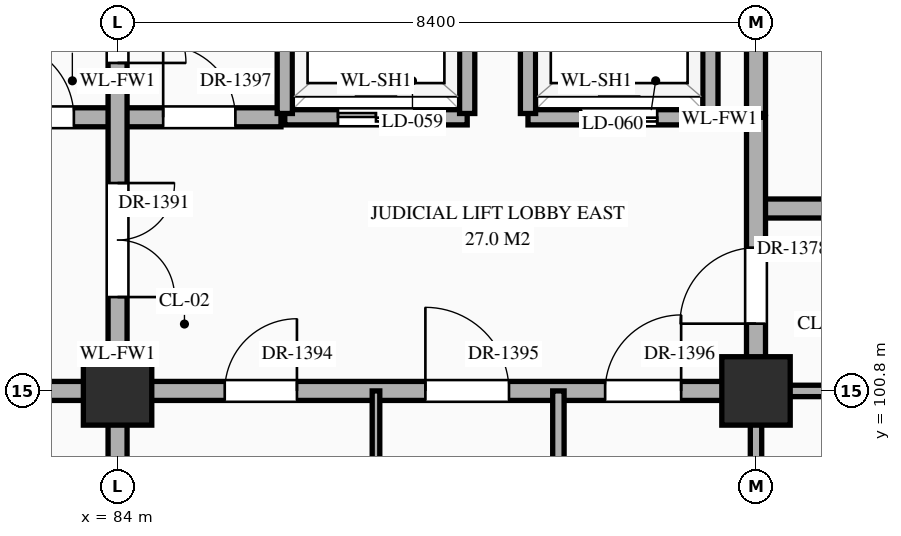
"""IFC4 building model, lengths in metres.
Left out: names, types, materials, properties, quantities, classifications, styles, units other than length and angle.
Written with IfcOpenShell. Run it as: python <this file> out.ifc"""

import sys

from ifc_helpers import new_model, si_unit, direction, frame, frame_2d, origin, origin_2d, place, context, subcontext, project, spatial, rectangle, extrude, element, fill, save


model = new_model("IFC4")
c1 = context("Model", 3, precision=1e-05, world=origin(), true_north=direction((0.0, 1.0)))
c2 = subcontext(c1, "Body", "Model", "MODEL_VIEW")
j1 = project(units=[si_unit("LENGTHUNIT", "METRE"), si_unit("PLANEANGLEUNIT", "RADIAN")], contexts=[c1])
p1 = place(None, origin())
s1 = spatial("IfcSite", under=j1, at=p1, CompositionType="ELEMENT")
p2 = place(p1, origin())
s2 = spatial("IfcBuilding", under=s1, at=p2, CompositionType="ELEMENT")
p3 = place(p2, frame((0.0, 0.0, 10.8)))
s3 = spatial("IfcBuildingStorey", under=s2, at=p3, CompositionType="ELEMENT", Elevation=10.8)
for number, where, z_axis, x_axis in (
    (1, (84.0, 100.8, 0.0), (0.0, 0.0, 1.0), (1.0, 0.0, 0.0)),
    (2, (92.4, 100.8, 0.0), (0.0, 0.0, 1.0), (1.0, 0.0, 0.0)),
):
    element("IfcColumn", number, at=place(p3, frame(where, z_axis=z_axis, x_axis=x_axis)), inside=s3, PredefinedType="COLUMN", context=c2, shape_type="SweptSolid", body=[
        extrude(rectangle(XDim=0.9, YDim=0.9, at=origin_2d()), origin(), (0.0, 0.0, 1.0), 5.4),
    ])
p4 = place(p3, frame((75.6, 100.8, 0.0), z_axis=(0.0, 0.0, 1.0), x_axis=(1.0, 0.0, 0.0)))
e3 = element("IfcWall", 3, at=p4, inside=s3, PredefinedType="STANDARD", context=c2, shape_type="SweptSolid", body=[
    extrude(rectangle(XDim=16.8, YDim=0.25, at=frame_2d((8.4, 0.0))), origin(), (0.0, 0.0, 1.0), 4.27),
])
p5 = place(p4, frame((3.65, 0.0, 0.0)))
e4 = element("IfcOpeningElement", 4, at=p5, cuts=e3, PredefinedType="OPENING", context=c2, shape_type="SweptSolid", body=[
    extrude(rectangle(XDim=1.1, YDim=2.2, at=frame_2d((0.55, 1.1))), frame((0.0, 0.137, 0.0), z_axis=(0.0, -1.0, 0.0), x_axis=(1.0, 0.0, 0.0)), (0.0, 0.0, 1.0), 0.274),
])
p6 = place(p4, frame((9.81, 0.0, 0.0)))
e5 = element("IfcOpeningElement", 5, at=p6, cuts=e3, PredefinedType="OPENING", context=c2, shape_type="SweptSolid", body=[
    extrude(rectangle(XDim=0.95, YDim=2.15, at=frame_2d((0.475, 1.075))), frame((0.0, 0.137, 0.0), z_axis=(0.0, -1.0, 0.0), x_axis=(1.0, 0.0, 0.0)), (0.0, 0.0, 1.0), 0.274),
])
p7 = place(p4, frame((12.45, 0.0, 0.0)))
e6 = element("IfcOpeningElement", 6, at=p7, cuts=e3, PredefinedType="OPENING", context=c2, shape_type="SweptSolid", body=[
    extrude(rectangle(XDim=1.1, YDim=2.2, at=frame_2d((0.55, 1.1))), frame((0.0, 0.137, 0.0), z_axis=(0.0, -1.0, 0.0), x_axis=(1.0, 0.0, 0.0)), (0.0, 0.0, 1.0), 0.274),
])
p8 = place(p4, frame((14.815, 0.0, 0.0)))
e7 = element("IfcOpeningElement", 7, at=p8, cuts=e3, PredefinedType="OPENING", context=c2, shape_type="SweptSolid", body=[
    extrude(rectangle(XDim=1.0, YDim=2.2, at=frame_2d((0.5, 1.1))), frame((0.0, 0.137, 0.0), z_axis=(0.0, -1.0, 0.0), x_axis=(1.0, 0.0, 0.0)), (0.0, 0.0, 1.0), 0.274),
])
p9 = place(p3, frame((92.4, 100.8, 0.0), z_axis=(0.0, 0.0, 1.0), x_axis=(1.0, 0.0, 0.0)))
e8 = element("IfcWall", 8, at=p9, inside=s3, PredefinedType="STANDARD", context=c2, shape_type="SweptSolid", body=[
    extrude(rectangle(XDim=4.2, YDim=0.15, at=frame_2d((2.1, 0.0))), origin(), (0.0, 0.0, 1.0), 4.27),
])
p10 = place(p9, frame((1.765, 0.0, 0.0)))
e9 = element("IfcOpeningElement", 9, at=p10, cuts=e8, PredefinedType="OPENING", context=c2, shape_type="SweptSolid", body=[
    extrude(rectangle(XDim=1.04, YDim=2.2, at=frame_2d((0.52, 1.1))), frame((0.0, 0.087, 0.0), z_axis=(0.0, -1.0, 0.0), x_axis=(1.0, 0.0, 0.0)), (0.0, 0.0, 1.0), 0.174),
])
p11 = place(p3, frame((92.4, 103.2, 0.0), z_axis=(0.0, 0.0, 1.0), x_axis=(1.0, 0.0, 0.0)))
e10 = element("IfcWall", 10, at=p11, inside=s3, PredefinedType="STANDARD", context=c2, shape_type="SweptSolid", body=[
    extrude(rectangle(XDim=4.2, YDim=0.25, at=frame_2d((2.1, 0.0))), origin(), (0.0, 0.0, 1.0), 5.12),
])
p12 = place(p11, frame((1.625, 0.0, 0.0)))
e11 = element("IfcOpeningElement", 11, at=p12, cuts=e10, PredefinedType="OPENING", context=c2, shape_type="SweptSolid", body=[
    extrude(rectangle(XDim=0.95, YDim=2.15, at=frame_2d((0.475, 1.075))), frame((0.0, 0.137, 0.0), z_axis=(0.0, -1.0, 0.0), x_axis=(1.0, 0.0, 0.0)), (0.0, 0.0, 1.0), 0.274),
])
p13 = place(p3, frame((81.85, 104.4, 0.0), z_axis=(0.0, 0.0, 1.0), x_axis=(1.0, 0.0, 0.0)))
e12 = element("IfcWall", 12, at=p13, inside=s3, PredefinedType="STANDARD", context=c2, shape_type="SweptSolid", body=[
    extrude(rectangle(XDim=4.3, YDim=0.25, at=frame_2d((2.15, 0.0))), origin(), (0.0, 0.0, 1.0), 5.12),
])
p14 = place(p13, frame((0.575, 0.0, 0.0)))
e13 = element("IfcOpeningElement", 13, at=p14, cuts=e12, PredefinedType="OPENING", context=c2, shape_type="SweptSolid", body=[
    extrude(rectangle(XDim=1.0, YDim=2.2, at=frame_2d((0.5, 1.1))), frame((0.0, 0.137, 0.0), z_axis=(0.0, -1.0, 0.0), x_axis=(1.0, 0.0, 0.0)), (0.0, 0.0, 1.0), 0.274),
])
p15 = place(p13, frame((2.75, 0.0, 0.0)))
e14 = element("IfcOpeningElement", 14, at=p15, cuts=e12, PredefinedType="OPENING", context=c2, shape_type="SweptSolid", body=[
    extrude(rectangle(XDim=0.95, YDim=2.15, at=frame_2d((0.475, 1.075))), frame((0.0, 0.137, 0.0), z_axis=(0.0, -1.0, 0.0), x_axis=(1.0, 0.0, 0.0)), (0.0, 0.0, 1.0), 0.274),
])
p16 = place(p3, frame((86.2, 104.4, 0.0), z_axis=(0.0, 0.0, 1.0), x_axis=(1.0, 0.0, 0.0)))
e15 = element("IfcWall", 15, at=p16, inside=s3, PredefinedType="STANDARD", context=c2, shape_type="SweptSolid", body=[
    extrude(rectangle(XDim=2.4, YDim=0.2, at=frame_2d((1.2, 0.0))), origin(), (0.0, 0.0, 1.0), 5.12),
])
p17 = place(p16, frame((0.7, 0.0, 0.0)))
e16 = element("IfcOpeningElement", 16, at=p17, cuts=e15, PredefinedType="OPENING", context=c2, shape_type="SweptSolid", body=[
    extrude(rectangle(XDim=1.0, YDim=2.15, at=frame_2d((0.5, 1.075))), frame((0.0, 0.112, 0.0), z_axis=(0.0, -1.0, 0.0), x_axis=(1.0, 0.0, 0.0)), (0.0, 0.0, 1.0), 0.224),
])
p18 = place(p3, frame((89.4, 104.4, 0.0), z_axis=(0.0, 0.0, 1.0), x_axis=(1.0, 0.0, 0.0)))
e17 = element("IfcWall", 17, at=p18, inside=s3, PredefinedType="STANDARD", context=c2, shape_type="SweptSolid", body=[
    extrude(rectangle(XDim=2.4, YDim=0.2, at=frame_2d((1.2, 0.0))), origin(), (0.0, 0.0, 1.0), 5.12),
])
p19 = place(p18, frame((0.7, 0.0, 0.0)))
e18 = element("IfcOpeningElement", 18, at=p19, cuts=e17, PredefinedType="OPENING", context=c2, shape_type="SweptSolid", body=[
    extrude(rectangle(XDim=1.0, YDim=2.15, at=frame_2d((0.5, 1.075))), frame((0.0, 0.112, 0.0), z_axis=(0.0, -1.0, 0.0), x_axis=(1.0, 0.0, 0.0)), (0.0, 0.0, 1.0), 0.224),
])
p20 = place(p3, frame((84.0, 79.2, 0.0), z_axis=(0.0, 0.0, 1.0), x_axis=(0.0, 1.0, 0.0)))
e19 = element("IfcWall", 19, at=p20, inside=s3, PredefinedType="STANDARD", context=c2, shape_type="SweptSolid", body=[
    extrude(rectangle(XDim=35.96, YDim=0.25, at=frame_2d((17.98, 0.0))), origin(), (0.0, 0.0, 1.0), 4.37),
])
p21 = place(p20, frame((22.835, 0.0, 0.0)))
e20 = element("IfcOpeningElement", 20, at=p21, cuts=e19, PredefinedType="OPENING", context=c2, shape_type="SweptSolid", body=[
    extrude(rectangle(XDim=1.5, YDim=2.25, at=frame_2d((0.75, 1.125))), frame((0.0, 0.137, 0.0), z_axis=(0.0, -1.0, 0.0), x_axis=(1.0, 0.0, 0.0)), (0.0, 0.0, 1.0), 0.274),
])
p22 = place(p20, frame((12.465, 0.0, 0.0)))
e21 = element("IfcOpeningElement", 21, at=p22, cuts=e19, PredefinedType="OPENING", context=c2, shape_type="SweptSolid", body=[
    extrude(rectangle(XDim=1.1, YDim=2.2, at=frame_2d((0.55, 1.1))), frame((0.0, 0.137, 0.0), z_axis=(0.0, -1.0, 0.0), x_axis=(1.0, 0.0, 0.0)), (0.0, 0.0, 1.0), 0.274),
])
p23 = place(p20, frame((15.31, 0.0, 0.0)))
e22 = element("IfcOpeningElement", 22, at=p23, cuts=e19, PredefinedType="OPENING", context=c2, shape_type="SweptSolid", body=[
    extrude(rectangle(XDim=0.95, YDim=2.15, at=frame_2d((0.475, 1.075))), frame((0.0, 0.137, 0.0), z_axis=(0.0, -1.0, 0.0), x_axis=(1.0, 0.0, 0.0)), (0.0, 0.0, 1.0), 0.274),
])
p24 = place(p20, frame((25.915, 0.0, 0.0)))
e23 = element("IfcOpeningElement", 23, at=p24, cuts=e19, PredefinedType="OPENING", context=c2, shape_type="SweptSolid", body=[
    extrude(rectangle(XDim=1.8, YDim=2.35, at=frame_2d((0.9, 1.175))), frame((0.0, 0.137, 0.0), z_axis=(0.0, -1.0, 0.0), x_axis=(1.0, 0.0, 0.0)), (0.0, 0.0, 1.0), 0.274),
])
p25 = place(p20, frame((29.71, 0.0, 0.0)))
e24 = element("IfcOpeningElement", 24, at=p25, cuts=e19, PredefinedType="OPENING", context=c2, shape_type="SweptSolid", body=[
    extrude(rectangle(XDim=0.95, YDim=2.15, at=frame_2d((0.475, 1.075))), frame((0.0, 0.137, 0.0), z_axis=(0.0, -1.0, 0.0), x_axis=(1.0, 0.0, 0.0)), (0.0, 0.0, 1.0), 0.274),
])
p26 = place(p20, frame((5.265, 0.0, 0.0)))
e25 = element("IfcOpeningElement", 25, at=p26, cuts=e19, PredefinedType="OPENING", context=c2, shape_type="SweptSolid", body=[
    extrude(rectangle(XDim=1.1, YDim=2.2, at=frame_2d((0.55, 1.1))), frame((0.0, 0.137, 0.0), z_axis=(0.0, -1.0, 0.0), x_axis=(1.0, 0.0, 0.0)), (0.0, 0.0, 1.0), 0.274),
])
p27 = place(p3, frame((86.2, 104.45, 0.0), z_axis=(0.0, 0.0, 1.0), x_axis=(0.0, 1.0, 0.0)))
e26 = element("IfcWall", 26, at=p27, inside=s3, PredefinedType="STANDARD", context=c2, shape_type="SweptSolid", body=[
    extrude(rectangle(XDim=2.3, YDim=0.2, at=frame_2d((1.15, 0.0))), origin(), (0.0, 0.0, 1.0), 5.12),
])
p28 = place(p3, frame((87.4, 96.0, 0.0), z_axis=(0.0, 0.0, 1.0), x_axis=(0.0, 1.0, 0.0)))
e27 = element("IfcWall", 27, at=p28, inside=s3, PredefinedType="STANDARD", context=c2, shape_type="SweptSolid", body=[
    extrude(rectangle(XDim=4.8, YDim=0.1, at=frame_2d((2.4, 0.0))), origin(), (0.0, 0.0, 1.0), 5.12),
])
p29 = place(p28, frame((1.88, 0.0, 0.0)))
e28 = element("IfcOpeningElement", 28, at=p29, cuts=e27, PredefinedType="OPENING", context=c2, shape_type="SweptSolid", body=[
    extrude(rectangle(XDim=1.04, YDim=2.2, at=frame_2d((0.52, 1.1))), frame((0.0, 0.062, 0.0), z_axis=(0.0, -1.0, 0.0), x_axis=(1.0, 0.0, 0.0)), (0.0, 0.0, 1.0), 0.124),
])
for number, where, z_axis, x_axis in (
    (29, (88.6, 104.45, 0.0), (0.0, 0.0, 1.0), (0.0, 1.0, 0.0)),
    (30, (89.4, 104.45, 0.0), (0.0, 0.0, 1.0), (0.0, 1.0, 0.0)),
):
    element("IfcWall", number, at=place(p3, frame(where, z_axis=z_axis, x_axis=x_axis)), inside=s3, PredefinedType="STANDARD", context=c2, shape_type="SweptSolid", body=[
        extrude(rectangle(XDim=2.3, YDim=0.2, at=frame_2d((1.15, 0.0))), origin(), (0.0, 0.0, 1.0), 5.12),
    ])
p30 = place(p3, frame((89.8, 96.0, 0.0), z_axis=(0.0, 0.0, 1.0), x_axis=(0.0, 1.0, 0.0)))
e31 = element("IfcWall", 31, at=p30, inside=s3, PredefinedType="STANDARD", context=c2, shape_type="SweptSolid", body=[
    extrude(rectangle(XDim=4.8, YDim=0.15, at=frame_2d((2.4, 0.0))), origin(), (0.0, 0.0, 1.0), 5.12),
])
p31 = place(p30, frame((1.86, 0.0, 0.0)))
e32 = element("IfcOpeningElement", 32, at=p31, cuts=e31, PredefinedType="OPENING", context=c2, shape_type="SweptSolid", body=[
    extrude(rectangle(XDim=1.08, YDim=2.25, at=frame_2d((0.54, 1.125))), frame((0.0, 0.087, 0.0), z_axis=(0.0, -1.0, 0.0), x_axis=(1.0, 0.0, 0.0)), (0.0, 0.0, 1.0), 0.174),
])
p32 = place(p3, frame((91.8, 104.45, 0.0), z_axis=(0.0, 0.0, 1.0), x_axis=(0.0, 1.0, 0.0)))
e33 = element("IfcWall", 33, at=p32, inside=s3, PredefinedType="STANDARD", context=c2, shape_type="SweptSolid", body=[
    extrude(rectangle(XDim=2.3, YDim=0.2, at=frame_2d((1.15, 0.0))), origin(), (0.0, 0.0, 1.0), 5.12),
])
p33 = place(p3, frame((92.4, 96.0, 0.0), z_axis=(0.0, 0.0, 1.0), x_axis=(0.0, 1.0, 0.0)))
e34 = element("IfcWall", 34, at=p33, inside=s3, PredefinedType="STANDARD", context=c2, shape_type="SweptSolid", body=[
    extrude(rectangle(XDim=4.8, YDim=0.15, at=frame_2d((2.4, 0.0))), origin(), (0.0, 0.0, 1.0), 4.37),
])
p34 = place(p3, frame((92.4, 100.8, 0.0), z_axis=(0.0, 0.0, 1.0), x_axis=(0.0, 1.0, 0.0)))
e35 = element("IfcWall", 35, at=p34, inside=s3, PredefinedType="STANDARD", context=c2, shape_type="SweptSolid", body=[
    extrude(rectangle(XDim=3.6, YDim=0.25, at=frame_2d((1.8, 0.0))), origin(), (0.0, 0.0, 1.0), 4.37),
])
p35 = place(p34, frame((0.885, 0.0, 0.0)))
e36 = element("IfcOpeningElement", 36, at=p35, cuts=e35, PredefinedType="OPENING", context=c2, shape_type="SweptSolid", body=[
    extrude(rectangle(XDim=1.0, YDim=2.2, at=frame_2d((0.5, 1.1))), frame((0.0, 0.137, 0.0), z_axis=(0.0, -1.0, 0.0), x_axis=(1.0, 0.0, 0.0)), (0.0, 0.0, 1.0), 0.274),
])
p36 = place(p3, frame((92.4, 104.45, 0.0), z_axis=(0.0, 0.0, 1.0), x_axis=(0.0, 1.0, 0.0)))
e37 = element("IfcWall", 37, at=p36, inside=s3, PredefinedType="STANDARD", context=c2, shape_type="SweptSolid", body=[
    extrude(rectangle(XDim=3.5, YDim=0.25, at=frame_2d((1.75, 0.0))), origin(), (0.0, 0.0, 1.0), 4.37),
])
p37 = place(p17, origin())
e38 = element("IfcDoor", 38, at=p37, inside=s3, OperationType="DOUBLE_DOOR_SLIDING", PredefinedType="DOOR", context=c2, shape_type="SweptSolid", body=[
    extrude(rectangle(XDim=1.0, YDim=2.15, at=frame_2d((0.5, 1.075))), frame((0.0, 0.025, 0.0), z_axis=(0.0, -1.0, 0.0), x_axis=(1.0, 0.0, 0.0)), (0.0, 0.0, 1.0), 0.05),
])
fill(e16, e38)
p38 = place(p19, origin())
e39 = element("IfcDoor", 39, at=p38, inside=s3, OperationType="DOUBLE_DOOR_SLIDING", PredefinedType="DOOR", context=c2, shape_type="SweptSolid", body=[
    extrude(rectangle(XDim=1.0, YDim=2.15, at=frame_2d((0.5, 1.075))), frame((0.0, 0.025, 0.0), z_axis=(0.0, -1.0, 0.0), x_axis=(1.0, 0.0, 0.0)), (0.0, 0.0, 1.0), 0.05),
])
fill(e18, e39)
p39 = place(p35, origin())
e40 = element("IfcDoor", 40, at=p39, inside=s3, OperationType="SINGLE_SWING_LEFT", PredefinedType="DOOR", context=c2, shape_type="SweptSolid", body=[
    extrude(rectangle(XDim=1.0, YDim=2.2, at=frame_2d((0.5, 1.1))), frame((0.0, 0.025, 0.0), z_axis=(0.0, -1.0, 0.0), x_axis=(1.0, 0.0, 0.0)), (0.0, 0.0, 1.0), 0.05),
])
fill(e36, e40)
p40 = place(p21, frame((1.5, 0.0, 0.0), z_axis=(0.0, 0.0, 1.0), x_axis=(-1.0, 0.0, 0.0)))
e41 = element("IfcDoor", 41, at=p40, inside=s3, OperationType="DOUBLE_DOOR_SINGLE_SWING", PredefinedType="DOOR", context=c2, shape_type="SweptSolid", body=[
    extrude(rectangle(XDim=1.5, YDim=2.25, at=frame_2d((0.75, 1.125))), frame((0.0, 0.025, 0.0), z_axis=(0.0, -1.0, 0.0), x_axis=(1.0, 0.0, 0.0)), (0.0, 0.0, 1.0), 0.05),
])
fill(e20, e41)
p41 = place(p14, origin())
e42 = element("IfcDoor", 42, at=p41, inside=s3, OperationType="SINGLE_SWING_LEFT", PredefinedType="DOOR", context=c2, shape_type="SweptSolid", body=[
    extrude(rectangle(XDim=1.0, YDim=2.2, at=frame_2d((0.5, 1.1))), frame((0.0, 0.025, 0.0), z_axis=(0.0, -1.0, 0.0), x_axis=(1.0, 0.0, 0.0)), (0.0, 0.0, 1.0), 0.05),
])
fill(e13, e42)
p42 = place(p6, origin())
e43 = element("IfcDoor", 43, at=p42, inside=s3, OperationType="SINGLE_SWING_RIGHT", PredefinedType="DOOR", context=c2, shape_type="SweptSolid", body=[
    extrude(rectangle(XDim=0.95, YDim=2.15, at=frame_2d((0.475, 1.075))), frame((0.0, 0.025, 0.0), z_axis=(0.0, -1.0, 0.0), x_axis=(1.0, 0.0, 0.0)), (0.0, 0.0, 1.0), 0.05),
])
fill(e5, e43)
p43 = place(p7, origin())
e44 = element("IfcDoor", 44, at=p43, inside=s3, OperationType="SINGLE_SWING_LEFT", PredefinedType="DOOR", context=c2, shape_type="SweptSolid", body=[
    extrude(rectangle(XDim=1.1, YDim=2.2, at=frame_2d((0.55, 1.1))), frame((0.0, 0.025, 0.0), z_axis=(0.0, -1.0, 0.0), x_axis=(1.0, 0.0, 0.0)), (0.0, 0.0, 1.0), 0.05),
])
fill(e6, e44)
p44 = place(p8, origin())
e45 = element("IfcDoor", 45, at=p44, inside=s3, OperationType="SINGLE_SWING_RIGHT", PredefinedType="DOOR", context=c2, shape_type="SweptSolid", body=[
    extrude(rectangle(XDim=1.0, YDim=2.2, at=frame_2d((0.5, 1.1))), frame((0.0, 0.025, 0.0), z_axis=(0.0, -1.0, 0.0), x_axis=(1.0, 0.0, 0.0)), (0.0, 0.0, 1.0), 0.05),
])
fill(e7, e45)
p45 = place(p15, origin())
e46 = element("IfcDoor", 46, at=p45, inside=s3, OperationType="SINGLE_SWING_LEFT", PredefinedType="DOOR", context=c2, shape_type="SweptSolid", body=[
    extrude(rectangle(XDim=0.95, YDim=2.15, at=frame_2d((0.475, 1.075))), frame((0.0, 0.025, 0.0), z_axis=(0.0, -1.0, 0.0), x_axis=(1.0, 0.0, 0.0)), (0.0, 0.0, 1.0), 0.05),
])
fill(e14, e46)
p46 = place(p24, frame((1.8, 0.0, 0.0), z_axis=(0.0, 0.0, 1.0), x_axis=(-1.0, 0.0, 0.0)))
e47 = element("IfcDoor", 47, at=p46, inside=s3, OperationType="DOUBLE_DOOR_SINGLE_SWING", PredefinedType="DOOR", context=c2, shape_type="SweptSolid", body=[
    extrude(rectangle(XDim=1.8, YDim=2.35, at=frame_2d((0.9, 1.175))), frame((0.0, 0.025, 0.0), z_axis=(0.0, -1.0, 0.0), x_axis=(1.0, 0.0, 0.0)), (0.0, 0.0, 1.0), 0.05),
])
fill(e23, e47)
save(model, sys.argv[1])
